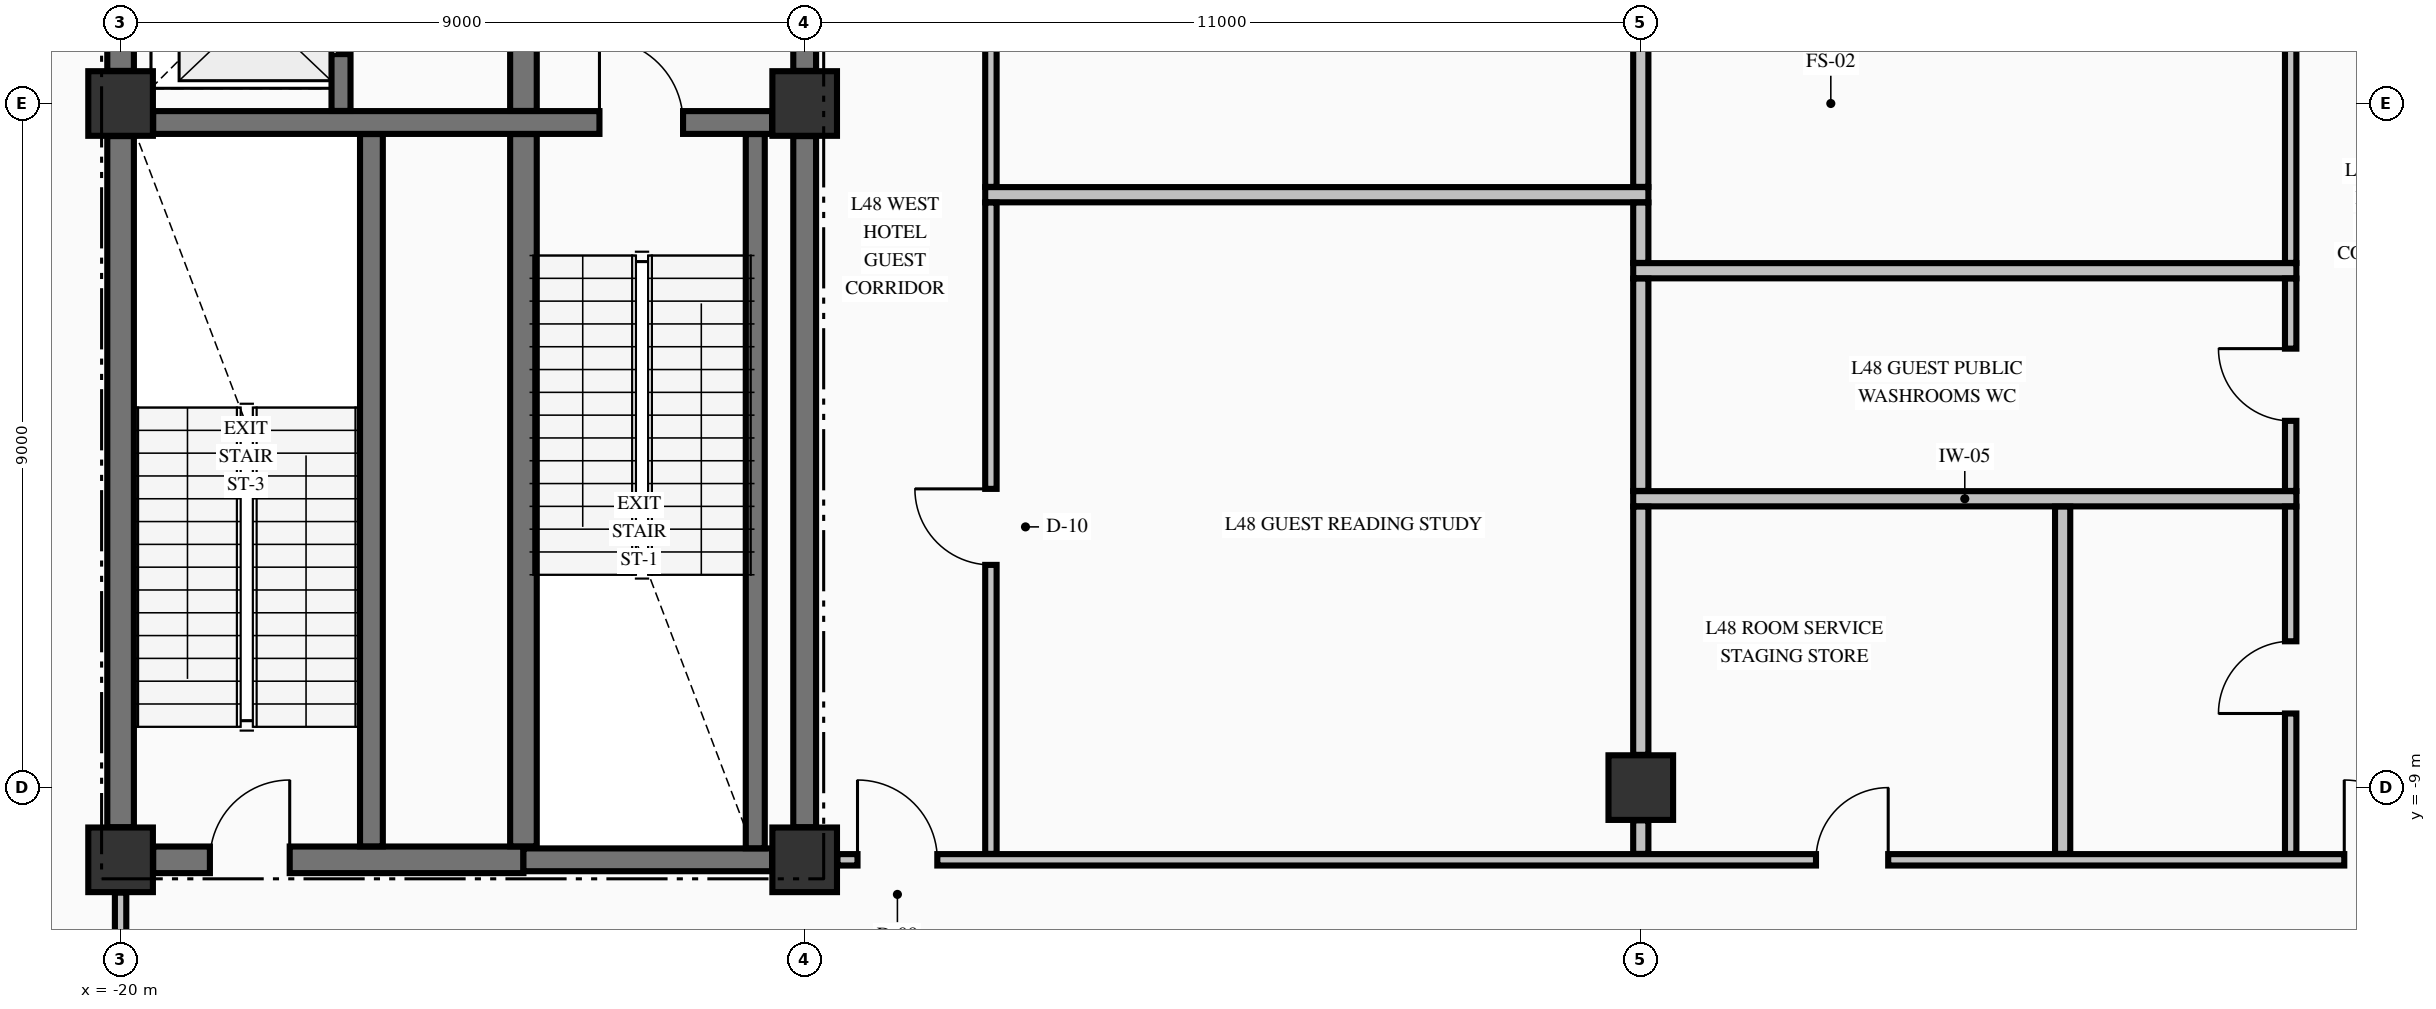
"""IFC4 building model, lengths in metres.
Left out: names, types, materials, properties, quantities, classifications, styles, units other than length and angle.
Written with IfcOpenShell. Run it as: python <this file> out.ifc"""

import sys

from ifc_helpers import new_model, si_unit, direction, frame, frame_2d, origin, origin_2d, place, context, subcontext, project, spatial, rectangle, extrude, element, fill, save


model = new_model("IFC4")
c1 = context("Model", 3, precision=1e-05, world=origin(), true_north=direction((0.0, 1.0)))
c2 = subcontext(c1, "Body", "Model", "MODEL_VIEW")
j1 = project(units=[si_unit("LENGTHUNIT", "METRE"), si_unit("PLANEANGLEUNIT", "RADIAN")], contexts=[c1])
p1 = place(None, origin())
s1 = spatial("IfcSite", under=j1, at=p1, CompositionType="ELEMENT")
p2 = place(p1, origin())
s2 = spatial("IfcBuilding", under=s1, at=p2, CompositionType="ELEMENT")
p3 = place(p2, frame((0.0, 0.0, 186.46)))
s3 = spatial("IfcBuildingStorey", under=s2, at=p3, CompositionType="ELEMENT", Elevation=186.46)
for number, where, z_axis, x_axis in (
    (1, (-20.0, -9.95, -0.425), (0.0, 0.0, 1.0), (1.0, 0.0, 0.0)),
    (2, (-11.0, -9.95, -0.425), (0.0, 0.0, 1.0), (1.0, 0.0, 0.0)),
    (3, (-11.0, 0.0, -0.425), (0.0, 0.0, 1.0), (1.0, 0.0, 0.0)),
    (4, (0.0, -9.0, -0.425), (0.0, 0.0, 1.0), (1.0, 0.0, 0.0)),
    (5, (-20.0, 0.0, -0.425), (0.0, 0.0, 1.0), (1.0, 0.0, 0.0)),
):
    element("IfcColumn", number, at=place(p3, frame(where, z_axis=z_axis, x_axis=x_axis)), inside=s3, PredefinedType="COLUMN", context=c2, shape_type="SweptSolid", body=[
        extrude(rectangle(XDim=0.85, YDim=0.85, at=origin_2d()), origin(), (0.0, 0.0, 1.0), 5.0),
    ])
p4 = place(p3, frame((-19.571, -9.95, 0.0), z_axis=(0.0, 0.0, 1.0), x_axis=(1.0, 0.0, 0.0)))
e6 = element("IfcWall", 6, at=p4, inside=s3, PredefinedType="SHEAR", context=c2, shape_type="SweptSolid", body=[
    extrude(rectangle(XDim=4.871, YDim=0.35, at=frame_2d((2.436, 0.0))), origin(), (0.0, 0.0, 1.0), 4.575),
])
p5 = place(p4, frame((0.746, 0.0, 0.0)))
e7 = element("IfcOpeningElement", 7, at=p5, cuts=e6, PredefinedType="OPENING", context=c2, shape_type="SweptSolid", body=[
    extrude(rectangle(XDim=1.05, YDim=2.15, at=frame_2d((0.525, 1.075))), frame((0.0, 0.185, 0.0), z_axis=(0.0, -1.0, 0.0), x_axis=(1.0, 0.0, 0.0)), (0.0, 0.0, 1.0), 0.37),
])
p6 = place(p3, frame((-14.7, -9.95, 0.0), z_axis=(0.0, 0.0, 1.0), x_axis=(1.0, 0.0, 0.0)))
e8 = element("IfcWall", 8, at=p6, inside=s3, PredefinedType="SHEAR", context=c2, shape_type="SweptSolid", body=[
    extrude(rectangle(XDim=3.271, YDim=0.3, at=frame_2d((1.635, 0.0))), origin(), (0.0, 0.0, 1.0), 4.575),
])
p7 = place(p3, frame((-19.571, -0.25, 0.0), z_axis=(0.0, 0.0, 1.0), x_axis=(1.0, 0.0, 0.0)))
e9 = element("IfcWall", 9, at=p7, inside=s3, PredefinedType="SHEAR", context=c2, shape_type="SweptSolid", body=[
    extrude(rectangle(XDim=8.142, YDim=0.3, at=frame_2d((4.071, 0.0))), origin(), (0.0, 0.0, 1.0), 4.575),
])
p8 = place(p7, frame((5.871, 0.0, 0.0)))
e10 = element("IfcOpeningElement", 10, at=p8, cuts=e9, PredefinedType="OPENING", context=c2, shape_type="SweptSolid", body=[
    extrude(rectangle(XDim=1.1, YDim=2.15, at=frame_2d((0.55, 1.075))), frame((0.0, 0.16, 0.0), z_axis=(0.0, -1.0, 0.0), x_axis=(1.0, 0.0, 0.0)), (0.0, 0.0, 1.0), 0.32),
])
p9 = place(p3, frame((-10.569, -9.95, 0.0), z_axis=(0.0, 0.0, 1.0), x_axis=(1.0, 0.0, 0.0)))
e11 = element("IfcWall", 11, at=p9, inside=s3, PredefinedType="PARTITIONING", context=c2, shape_type="SweptSolid", body=[
    extrude(rectangle(XDim=21.138, YDim=0.15, at=frame_2d((10.569, 0.0))), origin(), (0.0, 0.0, 1.0), 4.575),
])
p10 = place(p9, frame((0.264, 0.0, 0.0)))
e12 = element("IfcOpeningElement", 12, at=p10, cuts=e11, PredefinedType="OPENING", context=c2, shape_type="SweptSolid", body=[
    extrude(rectangle(XDim=1.05, YDim=2.15, at=frame_2d((0.525, 1.075))), frame((0.0, 0.085, 0.0), z_axis=(0.0, -1.0, 0.0), x_axis=(1.0, 0.0, 0.0)), (0.0, 0.0, 1.0), 0.17),
])
p11 = place(p9, frame((19.824, 0.0, 0.0)))
e13 = element("IfcOpeningElement", 13, at=p11, cuts=e11, PredefinedType="OPENING", context=c2, shape_type="SweptSolid", body=[
    extrude(rectangle(XDim=1.05, YDim=2.15, at=frame_2d((0.525, 1.075))), frame((0.0, 0.085, 0.0), z_axis=(0.0, -1.0, 0.0), x_axis=(1.0, 0.0, 0.0)), (0.0, 0.0, 1.0), 0.17),
])
p12 = place(p9, frame((12.874, 0.0, 0.0)))
e14 = element("IfcOpeningElement", 14, at=p12, cuts=e11, PredefinedType="OPENING", context=c2, shape_type="SweptSolid", body=[
    extrude(rectangle(XDim=0.95, YDim=2.15, at=frame_2d((0.475, 1.075))), frame((0.0, 0.085, 0.0), z_axis=(0.0, -1.0, 0.0), x_axis=(1.0, 0.0, 0.0)), (0.0, 0.0, 1.0), 0.17),
])
for number, where, z_axis, x_axis in (
    (15, (-0.1, -5.2, 0.0), (0.0, 0.0, 1.0), (1.0, 0.0, 0.0)),
    (16, (-0.1, -2.2, 0.0), (0.0, 0.0, 1.0), (1.0, 0.0, 0.0)),
    (17, (-8.625, -1.2, 0.0), (0.0, 0.0, 1.0), (1.0, 0.0, 0.0)),
):
    element("IfcWall", number, at=place(p3, frame(where, z_axis=z_axis, x_axis=x_axis)), inside=s3, PredefinedType="PARTITIONING", context=c2, shape_type="SweptSolid", body=[
        extrude(rectangle(XDim=8.725, YDim=0.2, at=frame_2d((4.363, 0.0))), origin(), (0.0, 0.0, 1.0), 4.575),
    ])
p13 = place(p3, frame((-20.0, -9.521, 0.0), z_axis=(0.0, 0.0, 1.0), x_axis=(0.0, 1.0, 0.0)))
e18 = element("IfcWall", 18, at=p13, inside=s3, PredefinedType="SHEAR", context=c2, shape_type="SweptSolid", body=[
    extrude(rectangle(XDim=9.092, YDim=0.35, at=frame_2d((4.546, 0.0))), origin(), (0.0, 0.0, 1.0), 4.575),
])
p14 = place(p3, frame((-20.0, 0.429, 0.0), z_axis=(0.0, 0.0, 1.0), x_axis=(0.0, 1.0, 0.0)))
e19 = element("IfcWall", 19, at=p14, inside=s3, PredefinedType="SHEAR", context=c2, shape_type="SweptSolid", body=[
    extrude(rectangle(XDim=2.094, YDim=0.35, at=frame_2d((1.047, 0.0))), origin(), (0.0, 0.0, 1.0), 4.575),
])
p15 = place(p3, frame((-17.1, -0.098, 0.0), z_axis=(0.0, 0.0, 1.0), x_axis=(0.0, 1.0, 0.0)))
e20 = element("IfcWall", 20, at=p15, inside=s3, PredefinedType="SOLIDWALL", context=c2, shape_type="SweptSolid", body=[
    extrude(rectangle(XDim=2.621, YDim=0.25, at=frame_2d((1.311, 0.0))), origin(), (0.0, 0.0, 1.0), 4.575),
])
p16 = place(p15, frame((0.748, 0.0, 0.0)))
e21 = element("IfcOpeningElement", 21, at=p16, cuts=e20, PredefinedType="OPENING", context=c2, shape_type="SweptSolid", body=[
    extrude(rectangle(XDim=1.1, YDim=2.2, at=frame_2d((0.55, 1.1))), frame((0.0, 0.135, 0.0), z_axis=(0.0, -1.0, 0.0), x_axis=(1.0, 0.0, 0.0)), (0.0, 0.0, 1.0), 0.27),
])
p17 = place(p3, frame((-16.7, -9.773, 0.0), z_axis=(0.0, 0.0, 1.0), x_axis=(0.0, 1.0, 0.0)))
e22 = element("IfcWall", 22, at=p17, inside=s3, PredefinedType="SHEAR", context=c2, shape_type="SweptSolid", body=[
    extrude(rectangle(XDim=9.371, YDim=0.3, at=frame_2d((4.686, 0.0))), origin(), (0.0, 0.0, 1.0), 4.575),
])
p18 = place(p3, frame((-14.7, -9.773, 0.0), z_axis=(0.0, 0.0, 1.0), x_axis=(0.0, 1.0, 0.0)))
e23 = element("IfcWall", 23, at=p18, inside=s3, PredefinedType="SHEAR", context=c2, shape_type="SweptSolid", body=[
    extrude(rectangle(XDim=9.371, YDim=0.35, at=frame_2d((4.686, 0.0))), origin(), (0.0, 0.0, 1.0), 4.575),
])
p19 = place(p3, frame((-14.7, -0.098, 0.0), z_axis=(0.0, 0.0, 1.0), x_axis=(0.0, 1.0, 0.0)))
e24 = element("IfcWall", 24, at=p19, inside=s3, PredefinedType="SHEAR", context=c2, shape_type="SweptSolid", body=[
    extrude(rectangle(XDim=2.846, YDim=0.35, at=frame_2d((1.423, 0.0))), origin(), (0.0, 0.0, 1.0), 4.575),
])
p20 = place(p3, frame((-11.65, -9.798, 0.0), z_axis=(0.0, 0.0, 1.0), x_axis=(0.0, 1.0, 0.0)))
e25 = element("IfcWall", 25, at=p20, inside=s3, PredefinedType="SOLIDWALL", context=c2, shape_type="SweptSolid", body=[
    extrude(rectangle(XDim=9.396, YDim=0.25, at=frame_2d((4.698, 0.0))), origin(), (0.0, 0.0, 1.0), 4.575),
])
p21 = place(p3, frame((-11.0, -9.521, 0.0), z_axis=(0.0, 0.0, 1.0), x_axis=(0.0, 1.0, 0.0)))
e26 = element("IfcWall", 26, at=p21, inside=s3, PredefinedType="SHEAR", context=c2, shape_type="SweptSolid", body=[
    extrude(rectangle(XDim=9.092, YDim=0.3, at=frame_2d((4.546, 0.0))), origin(), (0.0, 0.0, 1.0), 4.575),
])
p22 = place(p3, frame((-11.0, 0.429, 0.0), z_axis=(0.0, 0.0, 1.0), x_axis=(0.0, 1.0, 0.0)))
e27 = element("IfcWall", 27, at=p22, inside=s3, PredefinedType="SHEAR", context=c2, shape_type="SweptSolid", body=[
    extrude(rectangle(XDim=2.319, YDim=0.3, at=frame_2d((1.16, 0.0))), origin(), (0.0, 0.0, 1.0), 4.575),
])
p23 = place(p22, frame((0.671, 0.0, 0.0)))
e28 = element("IfcOpeningElement", 28, at=p23, cuts=e27, PredefinedType="OPENING", context=c2, shape_type="SweptSolid", body=[
    extrude(rectangle(XDim=1.1, YDim=2.15, at=frame_2d((0.55, 1.075))), frame((0.0, 0.16, 0.0), z_axis=(0.0, -1.0, 0.0), x_axis=(1.0, 0.0, 0.0)), (0.0, 0.0, 1.0), 0.32),
])
p24 = place(p3, frame((-20.0, -12.122, 0.0), z_axis=(0.0, 0.0, 1.0), x_axis=(0.0, 1.0, 0.0)))
e29 = element("IfcWall", 29, at=p24, inside=s3, PredefinedType="PARTITIONING", context=c2, shape_type="SweptSolid", body=[
    extrude(rectangle(XDim=1.741, YDim=0.15, at=frame_2d((0.871, 0.0))), origin(), (0.0, 0.0, 1.0), 3.767),
])
p25 = place(p3, frame((-8.55, -9.872, 0.0), z_axis=(0.0, 0.0, 1.0), x_axis=(0.0, 1.0, 0.0)))
e30 = element("IfcWall", 30, at=p25, inside=s3, PredefinedType="PARTITIONING", context=c2, shape_type="SweptSolid", body=[
    extrude(rectangle(XDim=8.569, YDim=0.15, at=frame_2d((4.285, 0.0))), origin(), (0.0, 0.0, 1.0), 4.575),
])
p26 = place(p25, frame((3.802, 0.0, 0.0)))
e31 = element("IfcOpeningElement", 31, at=p26, cuts=e30, PredefinedType="OPENING", context=c2, shape_type="SweptSolid", body=[
    extrude(rectangle(XDim=1.0, YDim=2.15, at=frame_2d((0.5, 1.075))), frame((0.0, 0.085, 0.0), z_axis=(0.0, -1.0, 0.0), x_axis=(1.0, 0.0, 0.0)), (0.0, 0.0, 1.0), 0.17),
])
p27 = place(p3, frame((-8.55, -1.097, 0.0), z_axis=(0.0, 0.0, 1.0), x_axis=(0.0, 1.0, 0.0)))
e32 = element("IfcWall", 32, at=p27, inside=s3, PredefinedType="PARTITIONING", context=c2, shape_type="SweptSolid", body=[
    extrude(rectangle(XDim=11.519, YDim=0.15, at=frame_2d((5.76, 0.0))), origin(), (0.0, 0.0, 1.0), 4.575),
])
p28 = place(p27, frame((5.197, 0.0, 0.0)))
e33 = element("IfcOpeningElement", 33, at=p28, cuts=e32, PredefinedType="OPENING", context=c2, shape_type="SweptSolid", body=[
    extrude(rectangle(XDim=1.1, YDim=2.15, at=frame_2d((0.55, 1.075))), frame((0.0, 0.085, 0.0), z_axis=(0.0, -1.0, 0.0), x_axis=(1.0, 0.0, 0.0)), (0.0, 0.0, 1.0), 0.17),
])
p29 = place(p3, frame((0.0, -9.872, 0.0), z_axis=(0.0, 0.0, 1.0), x_axis=(0.0, 1.0, 0.0)))
e34 = element("IfcWall", 34, at=p29, inside=s3, PredefinedType="PARTITIONING", context=c2, shape_type="SweptSolid", body=[
    extrude(rectangle(XDim=0.441, YDim=0.2, at=frame_2d((0.221, 0.0))), origin(), (0.0, 0.0, 1.0), 2.167),
])
p30 = place(p3, frame((0.0, -8.569, 0.0), z_axis=(0.0, 0.0, 1.0), x_axis=(0.0, 1.0, 0.0)))
e35 = element("IfcWall", 35, at=p30, inside=s3, PredefinedType="PARTITIONING", context=c2, shape_type="SweptSolid", body=[
    extrude(rectangle(XDim=3.266, YDim=0.2, at=frame_2d((1.633, 0.0))), origin(), (0.0, 0.0, 1.0), 3.767),
])
p31 = place(p3, frame((0.0, -5.097, 0.0), z_axis=(0.0, 0.0, 1.0), x_axis=(0.0, 1.0, 0.0)))
e36 = element("IfcWall", 36, at=p31, inside=s3, PredefinedType="PARTITIONING", context=c2, shape_type="SweptSolid", body=[
    extrude(rectangle(XDim=2.794, YDim=0.2, at=frame_2d((1.397, 0.0))), origin(), (0.0, 0.0, 1.0), 3.767),
])
p32 = place(p3, frame((0.0, -2.097, 0.0), z_axis=(0.0, 0.0, 1.0), x_axis=(0.0, 1.0, 0.0)))
e37 = element("IfcWall", 37, at=p32, inside=s3, PredefinedType="PARTITIONING", context=c2, shape_type="SweptSolid", body=[
    extrude(rectangle(XDim=0.794, YDim=0.2, at=frame_2d((0.397, 0.0))), origin(), (0.0, 0.0, 1.0), 3.767),
])
p33 = place(p3, frame((0.0, -1.097, 0.0), z_axis=(0.0, 0.0, 1.0), x_axis=(0.0, 1.0, 0.0)))
e38 = element("IfcWall", 38, at=p33, inside=s3, PredefinedType="PARTITIONING", context=c2, shape_type="SweptSolid", body=[
    extrude(rectangle(XDim=9.666, YDim=0.2, at=frame_2d((4.833, 0.0))), origin(), (0.0, 0.0, 1.0), 3.767),
])
p34 = place(p3, frame((5.55, -9.872, 0.0), z_axis=(0.0, 0.0, 1.0), x_axis=(0.0, 1.0, 0.0)))
e39 = element("IfcWall", 39, at=p34, inside=s3, PredefinedType="PARTITIONING", context=c2, shape_type="SweptSolid", body=[
    extrude(rectangle(XDim=4.569, YDim=0.2, at=frame_2d((2.285, 0.0))), origin(), (0.0, 0.0, 1.0), 4.575),
])
p35 = place(p3, frame((8.55, -9.872, 0.0), z_axis=(0.0, 0.0, 1.0), x_axis=(0.0, 1.0, 0.0)))
e40 = element("IfcWall", 40, at=p35, inside=s3, PredefinedType="PARTITIONING", context=c2, shape_type="SweptSolid", body=[
    extrude(rectangle(XDim=4.569, YDim=0.15, at=frame_2d((2.285, 0.0))), origin(), (0.0, 0.0, 1.0), 4.575),
])
p36 = place(p35, frame((1.847, 0.0, 0.0)))
e41 = element("IfcOpeningElement", 41, at=p36, cuts=e40, PredefinedType="OPENING", context=c2, shape_type="SweptSolid", body=[
    extrude(rectangle(XDim=0.95, YDim=2.15, at=frame_2d((0.475, 1.075))), frame((0.0, 0.085, 0.0), z_axis=(0.0, -1.0, 0.0), x_axis=(1.0, 0.0, 0.0)), (0.0, 0.0, 1.0), 0.17),
])
p37 = place(p3, frame((8.55, -5.097, 0.0), z_axis=(0.0, 0.0, 1.0), x_axis=(0.0, 1.0, 0.0)))
e42 = element("IfcWall", 42, at=p37, inside=s3, PredefinedType="PARTITIONING", context=c2, shape_type="SweptSolid", body=[
    extrude(rectangle(XDim=2.794, YDim=0.15, at=frame_2d((1.397, 0.0))), origin(), (0.0, 0.0, 1.0), 4.575),
])
p38 = place(p37, frame((0.922, 0.0, 0.0)))
e43 = element("IfcOpeningElement", 43, at=p38, cuts=e42, PredefinedType="OPENING", context=c2, shape_type="SweptSolid", body=[
    extrude(rectangle(XDim=0.95, YDim=2.15, at=frame_2d((0.475, 1.075))), frame((0.0, 0.085, 0.0), z_axis=(0.0, -1.0, 0.0), x_axis=(1.0, 0.0, 0.0)), (0.0, 0.0, 1.0), 0.17),
])
p39 = place(p3, frame((8.55, -2.097, 0.0), z_axis=(0.0, 0.0, 1.0), x_axis=(0.0, 1.0, 0.0)))
e44 = element("IfcWall", 44, at=p39, inside=s3, PredefinedType="PARTITIONING", context=c2, shape_type="SweptSolid", body=[
    extrude(rectangle(XDim=12.519, YDim=0.15, at=frame_2d((6.26, 0.0))), origin(), (0.0, 0.0, 1.0), 4.575),
])
p40 = place(p39, frame((5.697, 0.0, 0.0)))
e45 = element("IfcOpeningElement", 45, at=p40, cuts=e44, PredefinedType="OPENING", context=c2, shape_type="SweptSolid", body=[
    extrude(rectangle(XDim=1.1, YDim=2.15, at=frame_2d((0.55, 1.075))), frame((0.0, 0.085, 0.0), z_axis=(0.0, -1.0, 0.0), x_axis=(1.0, 0.0, 0.0)), (0.0, 0.0, 1.0), 0.17),
])
p41 = place(p8, origin())
e46 = element("IfcDoor", 46, at=p41, inside=s3, OperationType="SINGLE_SWING_LEFT", PredefinedType="DOOR", context=c2, shape_type="SweptSolid", body=[
    extrude(rectangle(XDim=1.1, YDim=2.15, at=frame_2d((0.55, 1.075))), frame((0.0, 0.025, 0.0), z_axis=(0.0, -1.0, 0.0), x_axis=(1.0, 0.0, 0.0)), (0.0, 0.0, 1.0), 0.05),
])
fill(e10, e46)
p42 = place(p5, origin())
e47 = element("IfcDoor", 47, at=p42, inside=s3, OperationType="SINGLE_SWING_RIGHT", PredefinedType="DOOR", context=c2, shape_type="SweptSolid", body=[
    extrude(rectangle(XDim=1.05, YDim=2.15, at=frame_2d((0.525, 1.075))), frame((0.0, 0.025, 0.0), z_axis=(0.0, -1.0, 0.0), x_axis=(1.0, 0.0, 0.0)), (0.0, 0.0, 1.0), 0.05),
])
fill(e7, e47)
p43 = place(p16, origin())
e48 = element("IfcDoor", 48, at=p43, inside=s3, OperationType="SLIDING_TO_LEFT", PredefinedType="DOOR", context=c2, shape_type="SweptSolid", body=[
    extrude(rectangle(XDim=1.1, YDim=2.2, at=frame_2d((0.55, 1.1))), frame((0.0, 0.025, 0.0), z_axis=(0.0, -1.0, 0.0), x_axis=(1.0, 0.0, 0.0)), (0.0, 0.0, 1.0), 0.05),
])
fill(e21, e48)
p44 = place(p10, origin())
e49 = element("IfcDoor", 49, at=p44, inside=s3, OperationType="SINGLE_SWING_LEFT", PredefinedType="DOOR", context=c2, shape_type="SweptSolid", body=[
    extrude(rectangle(XDim=1.05, YDim=2.15, at=frame_2d((0.525, 1.075))), frame((0.0, 0.025, 0.0), z_axis=(0.0, -1.0, 0.0), x_axis=(1.0, 0.0, 0.0)), (0.0, 0.0, 1.0), 0.05),
])
fill(e12, e49)
p45 = place(p11, origin())
e50 = element("IfcDoor", 50, at=p45, inside=s3, OperationType="SINGLE_SWING_LEFT", PredefinedType="DOOR", context=c2, shape_type="SweptSolid", body=[
    extrude(rectangle(XDim=1.05, YDim=2.15, at=frame_2d((0.525, 1.075))), frame((0.0, 0.025, 0.0), z_axis=(0.0, -1.0, 0.0), x_axis=(1.0, 0.0, 0.0)), (0.0, 0.0, 1.0), 0.05),
])
fill(e13, e50)
p46 = place(p26, origin())
e51 = element("IfcDoor", 51, at=p46, inside=s3, OperationType="SINGLE_SWING_RIGHT", PredefinedType="DOOR", context=c2, shape_type="SweptSolid", body=[
    extrude(rectangle(XDim=1.0, YDim=2.15, at=frame_2d((0.5, 1.075))), frame((0.0, 0.025, 0.0), z_axis=(0.0, -1.0, 0.0), x_axis=(1.0, 0.0, 0.0)), (0.0, 0.0, 1.0), 0.05),
])
fill(e31, e51)
p47 = place(p38, origin())
e52 = element("IfcDoor", 52, at=p47, inside=s3, OperationType="SINGLE_SWING_RIGHT", PredefinedType="DOOR", context=c2, shape_type="SweptSolid", body=[
    extrude(rectangle(XDim=0.95, YDim=2.15, at=frame_2d((0.475, 1.075))), frame((0.0, 0.025, 0.0), z_axis=(0.0, -1.0, 0.0), x_axis=(1.0, 0.0, 0.0)), (0.0, 0.0, 1.0), 0.05),
])
fill(e43, e52)
p48 = place(p36, origin())
e53 = element("IfcDoor", 53, at=p48, inside=s3, OperationType="SINGLE_SWING_LEFT", PredefinedType="DOOR", context=c2, shape_type="SweptSolid", body=[
    extrude(rectangle(XDim=0.95, YDim=2.15, at=frame_2d((0.475, 1.075))), frame((0.0, 0.025, 0.0), z_axis=(0.0, -1.0, 0.0), x_axis=(1.0, 0.0, 0.0)), (0.0, 0.0, 1.0), 0.05),
])
fill(e41, e53)
p49 = place(p12, origin())
e54 = element("IfcDoor", 54, at=p49, inside=s3, OperationType="SINGLE_SWING_RIGHT", PredefinedType="DOOR", context=c2, shape_type="SweptSolid", body=[
    extrude(rectangle(XDim=0.95, YDim=2.15, at=frame_2d((0.475, 1.075))), frame((0.0, 0.025, 0.0), z_axis=(0.0, -1.0, 0.0), x_axis=(1.0, 0.0, 0.0)), (0.0, 0.0, 1.0), 0.05),
])
fill(e14, e54)
save(model, sys.argv[1])
